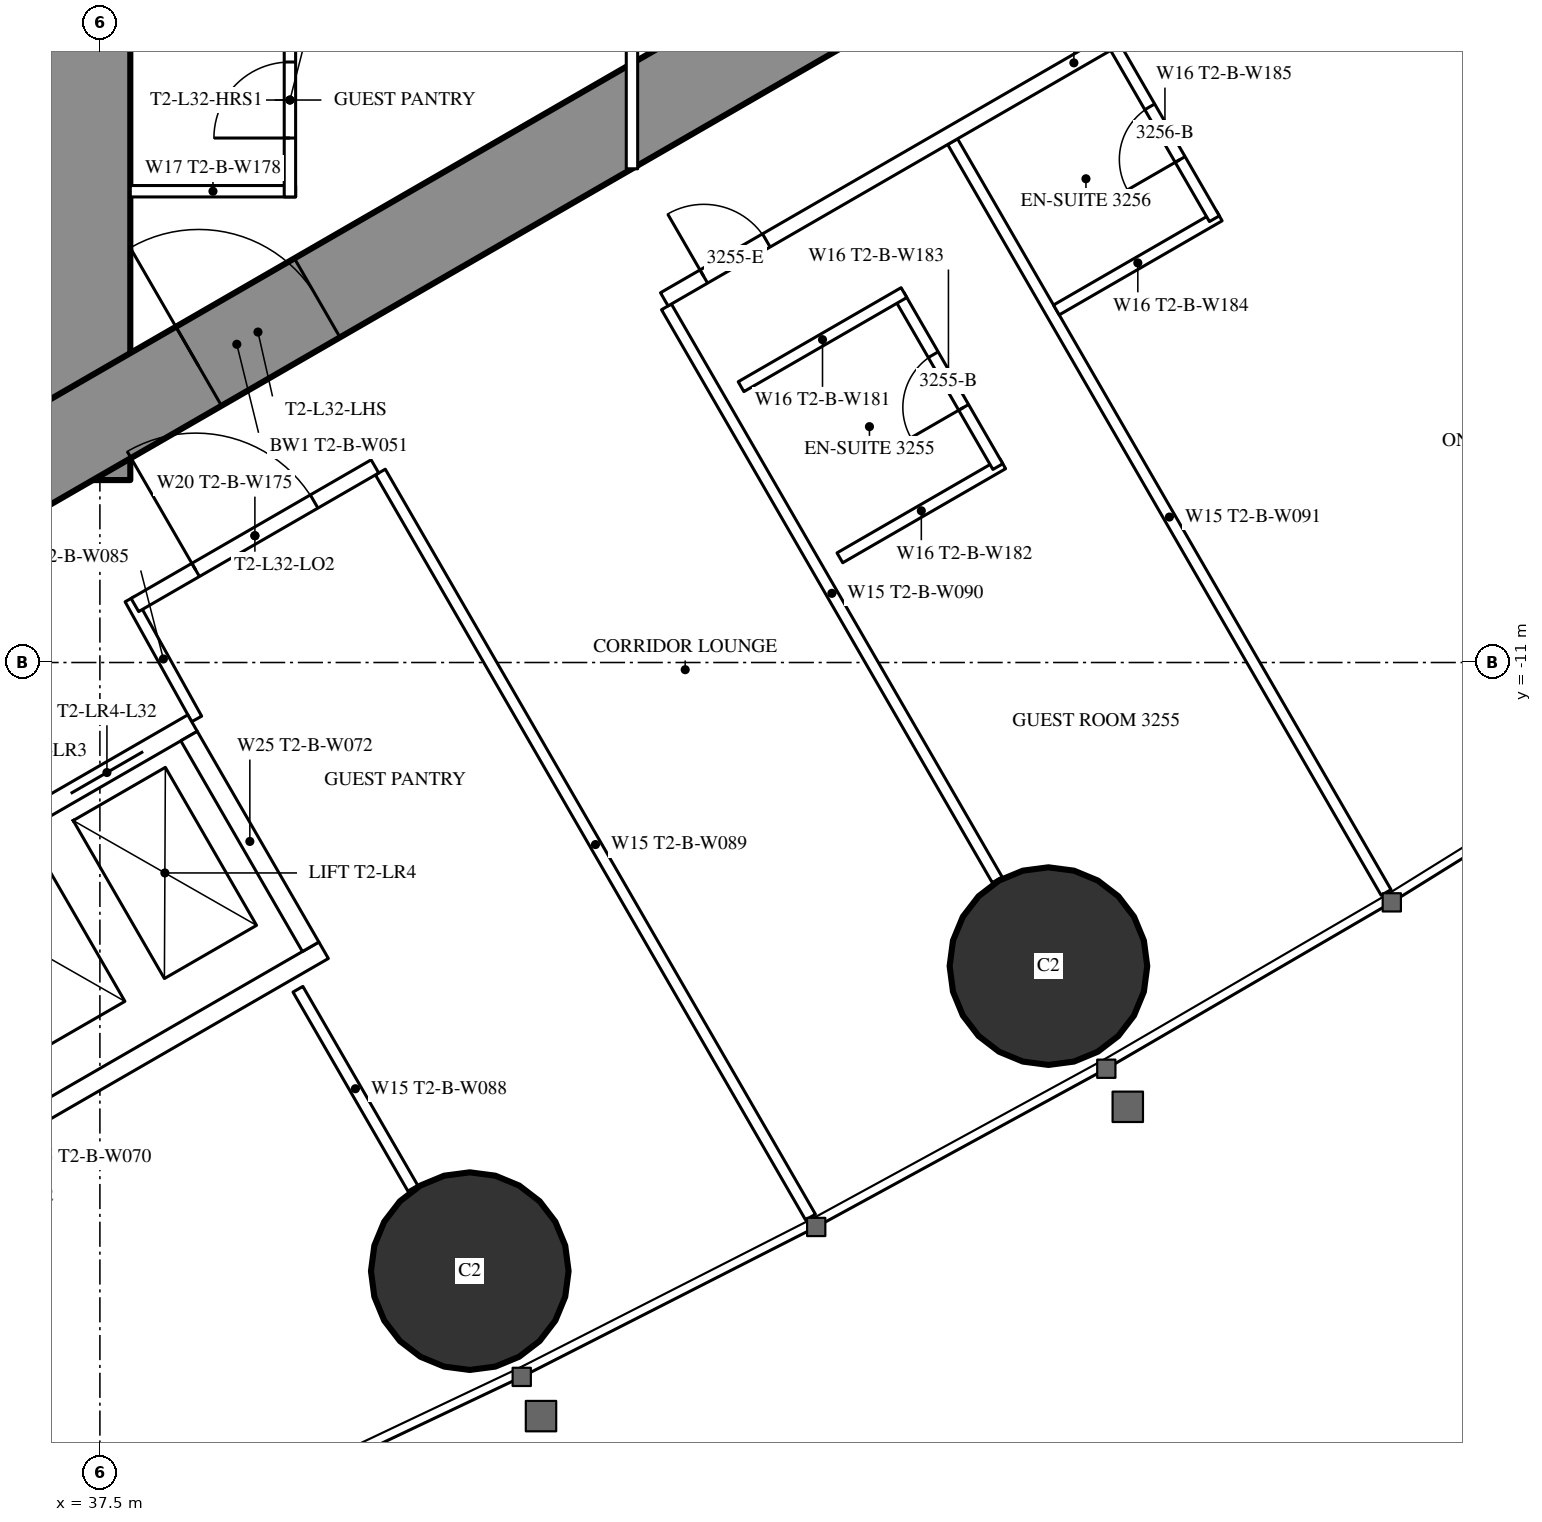
"""IFC4 building model, lengths in metres.
Left out: names, types, materials, properties, quantities, classifications, styles, units other than length and angle.
Written with IfcOpenShell. Run it as: python <this file> out.ifc"""

import sys

from ifc_helpers import new_model, si_unit, direction, frame, frame_2d, origin, origin_2d, place, context, subcontext, project, spatial, rectangle, hollow_circle, extrude, element, fill, save


model = new_model("IFC4")
c1 = context("Model", 3, precision=1e-05, world=origin(), true_north=direction((0.0, 1.0)))
c2 = subcontext(c1, "Body", "Model", "MODEL_VIEW")
j1 = project(units=[si_unit("LENGTHUNIT", "METRE"), si_unit("PLANEANGLEUNIT", "RADIAN")], contexts=[c1])
p1 = place(None, origin())
s1 = spatial("IfcSite", under=j1, at=p1, CompositionType="ELEMENT")
p2 = place(p1, origin())
s2 = spatial("IfcBuilding", under=s1, at=p2, CompositionType="ELEMENT")
p3 = place(p2, frame((0.0, 0.0, 122.1)))
s3 = spatial("IfcBuildingStorey", under=s2, at=p3, CompositionType="ELEMENT", Elevation=122.1)
for number, where, z_axis, x_axis in (
    (1, (42.366, -19.007, 0.0), (0.0, 0.0, 1.0), (1.0, 0.0, 0.0)),
    (2, (49.979, -14.994, 0.0), (0.0, 0.0, 1.0), (1.0, 0.0, 0.0)),
):
    element("IfcColumn", number, at=place(p3, frame(where, z_axis=z_axis, x_axis=x_axis)), inside=s3, PredefinedType="COLUMN", context=c2, shape_type="SweptSolid", body=[
        extrude(hollow_circle(Radius=1.3, WallThickness=0.1, at=origin_2d()), origin(), (0.0, 0.0, 1.0), 3.5),
    ])
p4 = place(p3, frame((37.3, -8.6, 0.0), z_axis=(0.0, 0.0, 1.0), x_axis=(0.0, 1.0, 0.0)))
e3 = element("IfcWall", 3, at=p4, inside=s3, PredefinedType="SHEAR", context=c2, shape_type="SweptSolid", body=[
    extrude(rectangle(XDim=17.2, YDim=1.2, at=frame_2d((8.6, 0.0))), origin(), (0.0, 0.0, 1.0), 3.5),
])
p5 = place(p4, frame((7.7, 0.0, 0.0)))
e4 = element("IfcOpeningElement", 4, at=p5, cuts=e3, PredefinedType="OPENING", context=c2, shape_type="SweptSolid", body=[
    extrude(rectangle(XDim=1.8, YDim=2.2, at=frame_2d((0.9, 1.1))), frame((0.0, 0.61, 0.0), z_axis=(0.0, -1.0, 0.0), x_axis=(1.0, 0.0, 0.0)), (0.0, 0.0, 1.0), 1.22),
])
p6 = place(p3, frame((27.2, -13.8, 0.0), z_axis=(0.0, 0.0, 1.0), x_axis=(0.866027159892, 0.499996958321, 0.0)))
e5 = element("IfcWall", 5, at=p6, inside=s3, PredefinedType="SHEAR", context=c2, shape_type="SweptSolid", body=[
    extrude(rectangle(XDim=27.947, YDim=1.2, at=frame_2d((13.973, 0.0))), origin(), (0.0, 0.0, 1.0), 3.5),
])
p7 = place(p6, frame((4.6, 0.0, 0.0)))
e6 = element("IfcOpeningElement", 6, at=p7, cuts=e5, PredefinedType="OPENING", context=c2, shape_type="SweptSolid", body=[
    extrude(rectangle(XDim=1.0, YDim=2.2, at=frame_2d((0.5, 1.1))), frame((0.0, 0.61, 0.0), z_axis=(0.0, -1.0, 0.0), x_axis=(1.0, 0.0, 0.0)), (0.0, 0.0, 1.0), 1.22),
])
p8 = place(p6, frame((13.395, 0.0, 0.0)))
e7 = element("IfcOpeningElement", 7, at=p8, cuts=e5, PredefinedType="OPENING", context=c2, shape_type="SweptSolid", body=[
    extrude(rectangle(XDim=1.8, YDim=2.2, at=frame_2d((0.9, 1.1))), frame((0.0, 0.61, 0.0), z_axis=(0.0, -1.0, 0.0), x_axis=(1.0, 0.0, 0.0)), (0.0, 0.0, 1.0), 1.22),
])
p9 = place(p3, frame((41.19, -8.494, 0.0), z_axis=(0.0, 0.0, 1.0), x_axis=(0.49999258054, -0.866029687369, 0.0)))
e8 = element("IfcWall", 8, at=p9, inside=s3, PredefinedType="PARTITIONING", context=c2, shape_type="SweptSolid", body=[
    extrude(rectangle(XDim=11.318, YDim=0.15, at=frame_2d((5.659, 0.0))), origin(), (0.0, 0.0, 1.0), 3.25),
])
p10 = place(p3, frame((44.954, -6.321, 0.0), z_axis=(0.0, 0.0, 1.0), x_axis=(0.500018676722, -0.866014620505, 0.0)))
e9 = element("IfcWall", 9, at=p10, inside=s3, PredefinedType="PARTITIONING", context=c2, shape_type="SweptSolid", body=[
    extrude(rectangle(XDim=8.704, YDim=0.15, at=frame_2d((4.352, 0.0))), origin(), (0.0, 0.0, 1.0), 2.2),
])
p11 = place(p3, frame((48.719, -4.147, 0.0), z_axis=(0.0, 0.0, 1.0), x_axis=(0.499990498062, -0.866030889661, 0.0)))
e10 = element("IfcWall", 10, at=p11, inside=s3, PredefinedType="PARTITIONING", context=c2, shape_type="SweptSolid", body=[
    extrude(rectangle(XDim=11.406, YDim=0.15, at=frame_2d((5.703, 0.0))), origin(), (0.0, 0.0, 1.0), 3.25),
])
p12 = place(p3, frame((40.105, -15.299, 0.0), z_axis=(0.0, 0.0, 1.0), x_axis=(0.499978822259, -0.866037630414, 0.0)))
e11 = element("IfcWall", 11, at=p12, inside=s3, PredefinedType="PARTITIONING", context=c2, shape_type="SweptSolid", body=[
    extrude(rectangle(XDim=3.023, YDim=0.15, at=frame_2d((1.511, 0.0))), origin(), (0.0, 0.0, 1.0), 3.25),
])
p13 = place(p3, frame((38.773, -11.742, 0.0), z_axis=(0.0, 0.0, 1.0), x_axis=(-0.485528096672, 0.8742210632, 0.0)))
e12 = element("IfcWall", 12, at=p13, inside=s3, PredefinedType="PARTITIONING", context=c2, shape_type="SweptSolid", body=[
    extrude(rectangle(XDim=1.805, YDim=0.15, at=frame_2d((0.903, 0.0))), origin(), (0.0, 0.0, 1.0), 3.25),
])
p14 = place(p3, frame((37.96, -10.243, 0.0), z_axis=(0.0, 0.0, 1.0), x_axis=(0.866042886279, 0.499969718208, 0.0)))
e13 = element("IfcWall", 13, at=p14, inside=s3, PredefinedType="PARTITIONING", context=c2, shape_type="SweptSolid", body=[
    extrude(rectangle(XDim=3.647, YDim=0.2, at=frame_2d((1.823, 0.0))), origin(), (0.0, 0.0, 1.0), 3.25),
])
p15 = place(p14, frame((0.923, 0.0, 0.0)))
e14 = element("IfcOpeningElement", 14, at=p15, cuts=e13, PredefinedType="OPENING", context=c2, shape_type="SweptSolid", body=[
    extrude(rectangle(XDim=1.8, YDim=2.2, at=frame_2d((0.9, 1.1))), frame((0.0, 0.11, 0.0), z_axis=(0.0, -1.0, 0.0), x_axis=(1.0, 0.0, 0.0)), (0.0, 0.0, 1.0), 0.22),
])
p16 = place(p3, frame((44.925, -6.222, 0.0), z_axis=(0.0, 0.0, 1.0), x_axis=(0.866020269055, 0.500008893506, 0.0)))
e15 = element("IfcWall", 15, at=p16, inside=s3, PredefinedType="PARTITIONING", context=c2, shape_type="SweptSolid", body=[
    extrude(rectangle(XDim=12.444, YDim=0.2, at=frame_2d((6.222, 0.0))), origin(), (0.0, 0.0, 1.0), 3.25),
])
p17 = place(p16, frame((0.6, 0.0, 0.0)))
e16 = element("IfcOpeningElement", 16, at=p17, cuts=e15, PredefinedType="OPENING", context=c2, shape_type="SweptSolid", body=[
    extrude(rectangle(XDim=0.95, YDim=2.2, at=frame_2d((0.475, 1.1))), frame((0.0, 0.11, 0.0), z_axis=(0.0, -1.0, 0.0), x_axis=(1.0, 0.0, 0.0)), (0.0, 0.0, 1.0), 0.22),
])
p18 = place(p16, frame((7.047, 0.0, 0.0)))
e17 = element("IfcOpeningElement", 17, at=p18, cuts=e15, PredefinedType="OPENING", context=c2, shape_type="SweptSolid", body=[
    extrude(rectangle(XDim=0.95, YDim=2.2, at=frame_2d((0.475, 1.1))), frame((0.0, 0.11, 0.0), z_axis=(0.0, -1.0, 0.0), x_axis=(1.0, 0.0, 0.0)), (0.0, 0.0, 1.0), 0.22),
])
p19 = place(p3, frame((47.235, -9.623, 0.0), z_axis=(0.0, 0.0, 1.0), x_axis=(0.866006523861, 0.500032699561, 0.0)))
e18 = element("IfcWall", 18, at=p19, inside=s3, PredefinedType="PARTITIONING", context=c2, shape_type="SweptSolid", body=[
    extrude(rectangle(XDim=2.475, YDim=0.15, at=frame_2d((1.237, 0.0))), origin(), (0.0, 0.0, 1.0), 3.25),
])
p20 = place(p3, frame((48.013, -6.171, 0.0), z_axis=(0.0, 0.0, 1.0), x_axis=(0.500006934395, -0.866021400173, 0.0)))
e19 = element("IfcWall", 19, at=p20, inside=s3, PredefinedType="PARTITIONING", context=c2, shape_type="SweptSolid", body=[
    extrude(rectangle(XDim=2.6, YDim=0.15, at=frame_2d((1.3, 0.0))), origin(), (0.0, 0.0, 1.0), 3.25),
])
p21 = place(p20, frame((0.9, 0.0, 0.0)))
e20 = element("IfcOpeningElement", 20, at=p21, cuts=e19, PredefinedType="OPENING", context=c2, shape_type="SweptSolid", body=[
    extrude(rectangle(XDim=0.8, YDim=2.2, at=frame_2d((0.4, 1.1))), frame((0.0, 0.085, 0.0), z_axis=(0.0, -1.0, 0.0), x_axis=(1.0, 0.0, 0.0)), (0.0, 0.0, 1.0), 0.17),
])
p22 = place(p3, frame((45.935, -7.371, 0.0), z_axis=(0.0, 0.0, 1.0), x_axis=(0.866031185235, 0.4999899861, 0.0)))
e21 = element("IfcWall", 21, at=p22, inside=s3, PredefinedType="PARTITIONING", context=c2, shape_type="SweptSolid", body=[
    extrude(rectangle(XDim=2.475, YDim=0.15, at=frame_2d((1.238, 0.0))), origin(), (0.0, 0.0, 1.0), 3.25),
])
p23 = place(p3, frame((50.083, -6.362, 0.0), z_axis=(0.0, 0.0, 1.0), x_axis=(0.866006523861, 0.500032699561, 0.0)))
e22 = element("IfcWall", 22, at=p23, inside=s3, PredefinedType="PARTITIONING", context=c2, shape_type="SweptSolid", body=[
    extrude(rectangle(XDim=2.475, YDim=0.15, at=frame_2d((1.237, 0.0))), origin(), (0.0, 0.0, 1.0), 3.25),
])
p24 = place(p3, frame((50.862, -2.91, 0.0), z_axis=(0.0, 0.0, 1.0), x_axis=(0.500047596559, -0.865997922154, 0.0)))
e23 = element("IfcWall", 23, at=p24, inside=s3, PredefinedType="PARTITIONING", context=c2, shape_type="SweptSolid", body=[
    extrude(rectangle(XDim=2.6, YDim=0.15, at=frame_2d((1.3, 0.0))), origin(), (0.0, 0.0, 1.0), 3.25),
])
p25 = place(p24, frame((0.9, 0.0, 0.0)))
e24 = element("IfcOpeningElement", 24, at=p25, cuts=e23, PredefinedType="OPENING", context=c2, shape_type="SweptSolid", body=[
    extrude(rectangle(XDim=0.8, YDim=2.2, at=frame_2d((0.4, 1.1))), frame((0.0, 0.085, 0.0), z_axis=(0.0, -1.0, 0.0), x_axis=(1.0, 0.0, 0.0)), (0.0, 0.0, 1.0), 0.17),
])
p26 = place(p3, frame((37.9, -4.8, 0.0), z_axis=(0.0, 0.0, 1.0), x_axis=(1.0, 0.0, 0.0)))
e25 = element("IfcWall", 25, at=p26, inside=s3, PredefinedType="PARTITIONING", context=c2, shape_type="SweptSolid", body=[
    extrude(rectangle(XDim=2.175, YDim=0.15, at=frame_2d((1.087, 0.0))), origin(), (0.0, 0.0, 1.0), 3.25),
])
p27 = place(p3, frame((40.0, -4.875, 0.0), z_axis=(0.0, 0.0, 1.0), x_axis=(0.0, 1.0, 0.0)))
e26 = element("IfcWall", 26, at=p27, inside=s3, PredefinedType="PARTITIONING", context=c2, shape_type="SweptSolid", body=[
    extrude(rectangle(XDim=2.55, YDim=0.15, at=frame_2d((1.275, 0.0))), origin(), (0.0, 0.0, 1.0), 3.25),
])
p28 = place(p27, frame((0.775, 0.0, 0.0)))
e27 = element("IfcOpeningElement", 27, at=p28, cuts=e26, PredefinedType="OPENING", context=c2, shape_type="SweptSolid", body=[
    extrude(rectangle(XDim=1.0, YDim=2.2, at=frame_2d((0.5, 1.1))), frame((0.0, 0.085, 0.0), z_axis=(0.0, -1.0, 0.0), x_axis=(1.0, 0.0, 0.0)), (0.0, 0.0, 1.0), 0.17),
])
p29 = place(p3, frame((44.5, -4.505, 0.0), z_axis=(0.0, 0.0, 1.0), x_axis=(0.0, 1.0, 0.0)))
e28 = element("IfcWall", 28, at=p29, inside=s3, PredefinedType="PARTITIONING", context=c2, shape_type="SweptSolid", body=[
    extrude(rectangle(XDim=9.009, YDim=0.15, at=frame_2d((4.505, 0.0))), origin(), (0.0, 0.0, 1.0), 2.45),
])
p30 = place(p29, frame((1.752, 0.0, 0.0)))
e29 = element("IfcOpeningElement", 29, at=p30, cuts=e28, PredefinedType="OPENING", context=c2, shape_type="SweptSolid", body=[
    extrude(rectangle(XDim=1.0, YDim=2.2, at=frame_2d((0.5, 1.1))), frame((0.0, 0.085, 0.0), z_axis=(0.0, -1.0, 0.0), x_axis=(1.0, 0.0, 0.0)), (0.0, 0.0, 1.0), 0.17),
])
p31 = place(p29, frame((6.257, 0.0, 0.0)))
e30 = element("IfcOpeningElement", 30, at=p31, cuts=e28, PredefinedType="OPENING", context=c2, shape_type="SweptSolid", body=[
    extrude(rectangle(XDim=1.0, YDim=2.2, at=frame_2d((0.5, 1.1))), frame((0.0, 0.085, 0.0), z_axis=(0.0, -1.0, 0.0), x_axis=(1.0, 0.0, 0.0)), (0.0, 0.0, 1.0), 0.17),
])
p32 = place(p3, frame((31.271, -16.097, 0.0), z_axis=(0.0, 0.0, 1.0), x_axis=(0.86604045752, 0.499973925258, 0.0)))
e31 = element("IfcWall", 31, at=p32, inside=s3, PredefinedType="PARTITIONING", context=c2, shape_type="SweptSolid", body=[
    extrude(rectangle(XDim=8.6, YDim=0.25, at=frame_2d((4.3, 0.0))), origin(), (0.0, 0.0, 1.0), 3.25),
])
p33 = place(p32, frame((0.75, 0.0, 0.0)))
e32 = element("IfcOpeningElement", 32, at=p33, cuts=e31, PredefinedType="OPENING", context=c2, shape_type="SweptSolid", body=[
    extrude(rectangle(XDim=1.1, YDim=2.2, at=frame_2d((0.55, 1.1))), frame((0.0, 0.135, 0.0), z_axis=(0.0, -1.0, 0.0), x_axis=(1.0, 0.0, 0.0)), (0.0, 0.0, 1.0), 0.27),
])
p34 = place(p32, frame((2.75, 0.0, 0.0)))
e33 = element("IfcOpeningElement", 33, at=p34, cuts=e31, PredefinedType="OPENING", context=c2, shape_type="SweptSolid", body=[
    extrude(rectangle(XDim=1.1, YDim=2.2, at=frame_2d((0.55, 1.1))), frame((0.0, 0.135, 0.0), z_axis=(0.0, -1.0, 0.0), x_axis=(1.0, 0.0, 0.0)), (0.0, 0.0, 1.0), 0.27),
])
p35 = place(p32, frame((4.75, 0.0, 0.0)))
e34 = element("IfcOpeningElement", 34, at=p35, cuts=e31, PredefinedType="OPENING", context=c2, shape_type="SweptSolid", body=[
    extrude(rectangle(XDim=1.1, YDim=2.2, at=frame_2d((0.55, 1.1))), frame((0.0, 0.135, 0.0), z_axis=(0.0, -1.0, 0.0), x_axis=(1.0, 0.0, 0.0)), (0.0, 0.0, 1.0), 0.27),
])
p36 = place(p32, frame((6.75, 0.0, 0.0)))
e35 = element("IfcOpeningElement", 35, at=p36, cuts=e31, PredefinedType="OPENING", context=c2, shape_type="SweptSolid", body=[
    extrude(rectangle(XDim=1.1, YDim=2.2, at=frame_2d((0.55, 1.1))), frame((0.0, 0.135, 0.0), z_axis=(0.0, -1.0, 0.0), x_axis=(1.0, 0.0, 0.0)), (0.0, 0.0, 1.0), 0.27),
])
p37 = place(p3, frame((32.996, -19.086, 0.0), z_axis=(0.0, 0.0, 1.0), x_axis=(0.866028165386, 0.499995216735, 0.0)))
e36 = element("IfcWall", 36, at=p37, inside=s3, PredefinedType="PARTITIONING", context=c2, shape_type="SweptSolid", body=[
    extrude(rectangle(XDim=8.6, YDim=0.25, at=frame_2d((4.3, 0.0))), origin(), (0.0, 0.0, 1.0), 3.25),
])
p38 = place(p3, frame((38.673, -11.968, 0.0), z_axis=(0.0, 0.0, 1.0), x_axis=(0.499929347863, -0.866066190972, 0.0)))
e37 = element("IfcWall", 37, at=p38, inside=s3, PredefinedType="PARTITIONING", context=c2, shape_type="SweptSolid", body=[
    extrude(rectangle(XDim=3.201, YDim=0.25, at=frame_2d((1.6, 0.0))), origin(), (0.0, 0.0, 1.0), 3.25),
])
p39 = place(p21, origin())
e38 = element("IfcDoor", 38, at=p39, inside=s3, OperationType="SINGLE_SWING_RIGHT", PredefinedType="DOOR", context=c2, shape_type="SweptSolid", body=[
    extrude(rectangle(XDim=0.8, YDim=2.2, at=frame_2d((0.4, 1.1))), frame((0.0, 0.025, 0.0), z_axis=(0.0, -1.0, 0.0), x_axis=(1.0, 0.0, 0.0)), (0.0, 0.0, 1.0), 0.05),
])
fill(e20, e38)
p40 = place(p17, origin())
e39 = element("IfcDoor", 39, at=p40, inside=s3, OperationType="SINGLE_SWING_LEFT", PredefinedType="DOOR", context=c2, shape_type="SweptSolid", body=[
    extrude(rectangle(XDim=0.95, YDim=2.2, at=frame_2d((0.475, 1.1))), frame((0.0, 0.025, 0.0), z_axis=(0.0, -1.0, 0.0), x_axis=(1.0, 0.0, 0.0)), (0.0, 0.0, 1.0), 0.05),
])
fill(e16, e39)
p41 = place(p25, origin())
e40 = element("IfcDoor", 40, at=p41, inside=s3, OperationType="SINGLE_SWING_RIGHT", PredefinedType="DOOR", context=c2, shape_type="SweptSolid", body=[
    extrude(rectangle(XDim=0.8, YDim=2.2, at=frame_2d((0.4, 1.1))), frame((0.0, 0.025, 0.0), z_axis=(0.0, -1.0, 0.0), x_axis=(1.0, 0.0, 0.0)), (0.0, 0.0, 1.0), 0.05),
])
fill(e24, e40)
p42 = place(p15, origin())
e41 = element("IfcDoor", 41, at=p42, inside=s3, OperationType="DOUBLE_DOOR_SINGLE_SWING", PredefinedType="DOOR", context=c2, shape_type="SweptSolid", body=[
    extrude(rectangle(XDim=1.8, YDim=2.2, at=frame_2d((0.9, 1.1))), frame((0.0, 0.025, 0.0), z_axis=(0.0, -1.0, 0.0), x_axis=(1.0, 0.0, 0.0)), (0.0, 0.0, 1.0), 0.05),
])
fill(e14, e41)
p43 = place(p28, origin())
e42 = element("IfcDoor", 42, at=p43, inside=s3, OperationType="SINGLE_SWING_LEFT", PredefinedType="DOOR", context=c2, shape_type="SweptSolid", body=[
    extrude(rectangle(XDim=1.0, YDim=2.2, at=frame_2d((0.5, 1.1))), frame((0.0, 0.025, 0.0), z_axis=(0.0, -1.0, 0.0), x_axis=(1.0, 0.0, 0.0)), (0.0, 0.0, 1.0), 0.05),
])
fill(e27, e42)
p44 = place(p8, origin())
e43 = element("IfcDoor", 43, at=p44, inside=s3, OperationType="DOUBLE_DOOR_SINGLE_SWING", PredefinedType="DOOR", context=c2, shape_type="SweptSolid", body=[
    extrude(rectangle(XDim=1.8, YDim=2.2, at=frame_2d((0.9, 1.1))), frame((0.0, 0.025, 0.0), z_axis=(0.0, -1.0, 0.0), x_axis=(1.0, 0.0, 0.0)), (0.0, 0.0, 1.0), 0.05),
])
fill(e7, e43)
p45 = place(p36, origin())
e44 = element("IfcDoor", 44, at=p45, inside=s3, OperationType="DOUBLE_DOOR_SLIDING", PredefinedType="USERDEFINED", context=c2, shape_type="SweptSolid", body=[
    extrude(rectangle(XDim=1.1, YDim=2.2, at=frame_2d((0.55, 1.1))), frame((0.0, 0.025, 0.0), z_axis=(0.0, -1.0, 0.0), x_axis=(1.0, 0.0, 0.0)), (0.0, 0.0, 1.0), 0.05),
])
fill(e35, e44)
save(model, sys.argv[1])
